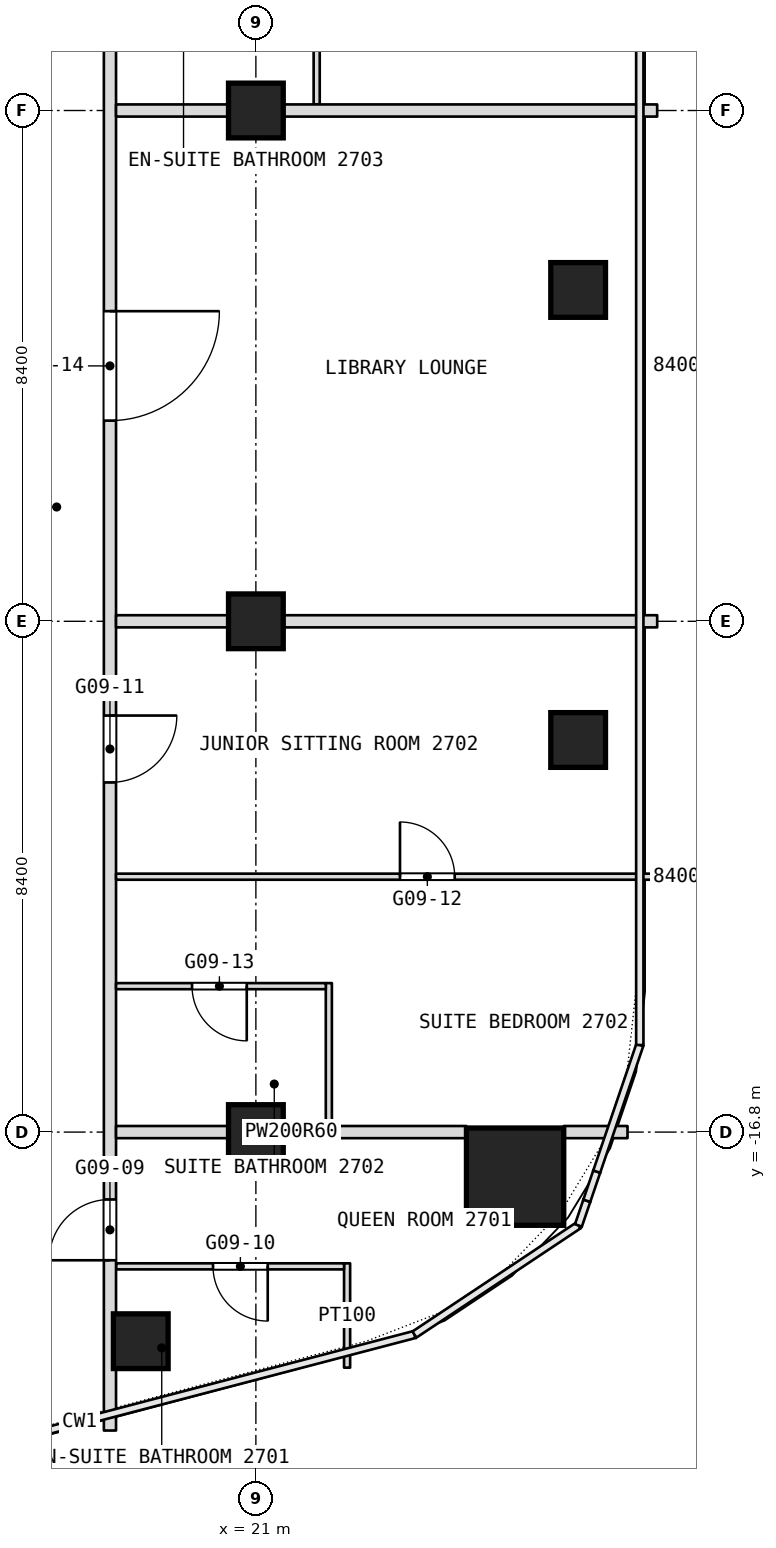
"""IFC4 building model, lengths in metres.
Left out: names, types, materials, properties, quantities, classifications, styles, units other than length and angle.
Written with IfcOpenShell. Run it as: python <this file> out.ifc"""

import sys

from ifc_helpers import new_model, si_unit, direction, frame, frame_2d, origin, origin_2d, place, context, subcontext, project, spatial, rectangle, extrude, element, fill, save


model = new_model("IFC4")
c1 = context("Model", 3, precision=1e-05, world=origin(), true_north=direction((0.0, 1.0)))
c2 = subcontext(c1, "Body", "Model", "MODEL_VIEW")
j1 = project(units=[si_unit("LENGTHUNIT", "METRE"), si_unit("PLANEANGLEUNIT", "RADIAN")], contexts=[c1])
p1 = place(None, origin())
s1 = spatial("IfcSite", under=j1, at=p1, CompositionType="ELEMENT")
p2 = place(p1, origin())
s2 = spatial("IfcBuilding", under=s1, at=p2, CompositionType="ELEMENT")
p3 = place(p2, frame((0.0, 0.0, 122.9)))
s3 = spatial("IfcBuildingStorey", under=s2, at=p3, CompositionType="ELEMENT", Elevation=122.9)
p4 = place(p3, frame((25.263, -17.533, 0.0), z_axis=(0.0, 0.0, 1.0), x_axis=(1.0, 0.0, 0.0)))
e1 = element("IfcColumn", 1, at=p4, inside=s3, PredefinedType="COLUMN", context=c2, shape_type="SweptSolid", body=[
    extrude(rectangle(XDim=1.6, YDim=1.6, at=origin_2d()), origin(), (0.0, 0.0, 1.0), 3.6),
])
for number, where, z_axis, x_axis in (
    (2, (21.0, -16.8, 0.0), (0.0, 0.0, 1.0), (1.0, 0.0, 0.0)),
    (3, (21.0, -8.4, 0.0), (0.0, 0.0, 1.0), (1.0, 0.0, 0.0)),
    (4, (21.0, 0.0, 0.0), (0.0, 0.0, 1.0), (1.0, 0.0, 0.0)),
    (5, (26.3, -2.951, 0.0), (0.0, 0.0, 1.0), (1.0, 0.0, 0.0)),
    (6, (26.3, -10.352, 0.0), (0.0, 0.0, 1.0), (1.0, 0.0, 0.0)),
    (7, (19.107, -20.239, 0.0), (0.0, 0.0, 1.0), (1.0, 0.0, 0.0)),
):
    element("IfcColumn", number, at=place(p3, frame(where, z_axis=z_axis, x_axis=x_axis)), inside=s3, PredefinedType="COLUMN", context=c2, shape_type="SweptSolid", body=[
        extrude(rectangle(XDim=0.9, YDim=0.9, at=origin_2d()), origin(), (0.0, 0.0, 1.0), 3.6),
    ])
p5 = place(p3, frame((22.5, -20.674, 0.0), z_axis=(0.0, 0.0, 1.0), x_axis=(0.0, 1.0, 0.0)))
e8 = element("IfcWall", 8, at=p5, inside=s3, PredefinedType="PARTITIONING", context=c2, shape_type="SweptSolid", body=[
    extrude(rectangle(XDim=1.716, YDim=0.1, at=frame_2d((0.858, 0.0))), origin(), (0.0, 0.0, 1.0), 3.34),
])
p6 = place(p3, frame((22.2, -16.7, 0.0), z_axis=(0.0, 0.0, 1.0), x_axis=(0.0, 1.0, 0.0)))
e9 = element("IfcWall", 9, at=p6, inside=s3, PredefinedType="PARTITIONING", context=c2, shape_type="SweptSolid", body=[
    extrude(rectangle(XDim=2.35, YDim=0.1, at=frame_2d((1.175, 0.0))), origin(), (0.0, 0.0, 1.0), 3.34),
])
p7 = place(p3, frame((22.0, 0.1, 0.0), z_axis=(0.0, 0.0, 1.0), x_axis=(0.0, 1.0, 0.0)))
e10 = element("IfcWall", 10, at=p7, inside=s3, PredefinedType="PARTITIONING", context=c2, shape_type="SweptSolid", body=[
    extrude(rectangle(XDim=2.35, YDim=0.1, at=frame_2d((1.175, 0.0))), origin(), (0.0, 0.0, 1.0), 3.34),
])
p8 = place(p7, frame((1.3, 0.0, 0.0)))
e11 = element("IfcOpeningElement", 11, at=p8, cuts=e10, PredefinedType="OPENING", context=c2, shape_type="SweptSolid", body=[
    extrude(rectangle(XDim=0.9, YDim=2.1, at=frame_2d((0.45, 1.05))), frame((0.0, 0.05, 0.0), z_axis=(0.0, -1.0, 0.0), x_axis=(1.0, 0.0, 0.0)), (0.0, 0.0, 1.0), 0.1),
])
p9 = place(p3, frame((18.7, -19.008, 0.0), z_axis=(0.0, 0.0, 1.0), x_axis=(1.0, 0.0, 0.0)))
e12 = element("IfcWall", 12, at=p9, inside=s3, PredefinedType="PARTITIONING", context=c2, shape_type="SweptSolid", body=[
    extrude(rectangle(XDim=3.75, YDim=0.1, at=frame_2d((1.875, 0.0))), origin(), (0.0, 0.0, 1.0), 3.34),
])
p10 = place(p9, frame((1.595, 0.0, 0.0)))
e13 = element("IfcOpeningElement", 13, at=p10, cuts=e12, PredefinedType="OPENING", context=c2, shape_type="SweptSolid", body=[
    extrude(rectangle(XDim=0.9, YDim=2.1, at=frame_2d((0.45, 1.05))), frame((0.0, 0.05, 0.0), z_axis=(0.0, -1.0, 0.0), x_axis=(1.0, 0.0, 0.0)), (0.0, 0.0, 1.0), 0.1),
])
p11 = place(p3, frame((18.6, -21.708, 0.0), z_axis=(0.0, 0.0, 1.0), x_axis=(0.0, 1.0, 0.0)))
e14 = element("IfcWall", 14, at=p11, inside=s3, PredefinedType="PARTITIONING", context=c2, shape_type="SweptSolid", body=[
    extrude(rectangle(XDim=49.648, YDim=0.2, at=frame_2d((24.824, 0.0))), origin(), (0.0, 0.0, 1.0), 3.34),
])
p12 = place(p11, frame((2.8, 0.0, 0.0)))
e15 = element("IfcOpeningElement", 15, at=p12, cuts=e14, PredefinedType="OPENING", context=c2, shape_type="SweptSolid", body=[
    extrude(rectangle(XDim=1.0, YDim=2.1, at=frame_2d((0.5, 1.05))), frame((0.0, 0.1, 0.0), z_axis=(0.0, -1.0, 0.0), x_axis=(1.0, 0.0, 0.0)), (0.0, 0.0, 1.0), 0.2),
])
p13 = place(p11, frame((10.658, 0.0, 0.0)))
e16 = element("IfcOpeningElement", 16, at=p13, cuts=e14, PredefinedType="OPENING", context=c2, shape_type="SweptSolid", body=[
    extrude(rectangle(XDim=1.1, YDim=2.1, at=frame_2d((0.55, 1.05))), frame((0.0, 0.1, 0.0), z_axis=(0.0, -1.0, 0.0), x_axis=(1.0, 0.0, 0.0)), (0.0, 0.0, 1.0), 0.2),
])
p14 = place(p11, frame((16.608, 0.0, 0.0)))
e17 = element("IfcOpeningElement", 17, at=p14, cuts=e14, PredefinedType="OPENING", context=c2, shape_type="SweptSolid", body=[
    extrude(rectangle(XDim=1.8, YDim=2.1, at=frame_2d((0.9, 1.05))), frame((0.0, 0.1, 0.0), z_axis=(0.0, -1.0, 0.0), x_axis=(1.0, 0.0, 0.0)), (0.0, 0.0, 1.0), 0.2),
])
p15 = place(p11, frame((24.508, 0.0, 0.0)))
e18 = element("IfcOpeningElement", 18, at=p15, cuts=e14, PredefinedType="OPENING", context=c2, shape_type="SweptSolid", body=[
    extrude(rectangle(XDim=1.0, YDim=2.1, at=frame_2d((0.5, 1.05))), frame((0.0, 0.1, 0.0), z_axis=(0.0, -1.0, 0.0), x_axis=(1.0, 0.0, 0.0)), (0.0, 0.0, 1.0), 0.2),
])
p16 = place(p11, frame((26.308, 0.0, 0.0)))
e19 = element("IfcOpeningElement", 19, at=p16, cuts=e14, PredefinedType="OPENING", context=c2, shape_type="SweptSolid", body=[
    extrude(rectangle(XDim=1.0, YDim=2.1, at=frame_2d((0.5, 1.05))), frame((0.0, 0.1, 0.0), z_axis=(0.0, -1.0, 0.0), x_axis=(1.0, 0.0, 0.0)), (0.0, 0.0, 1.0), 0.2),
])
p17 = place(p11, frame((33.708, 0.0, 0.0)))
e20 = element("IfcOpeningElement", 20, at=p17, cuts=e14, PredefinedType="OPENING", context=c2, shape_type="SweptSolid", body=[
    extrude(rectangle(XDim=1.1, YDim=2.1, at=frame_2d((0.55, 1.05))), frame((0.0, 0.1, 0.0), z_axis=(0.0, -1.0, 0.0), x_axis=(1.0, 0.0, 0.0)), (0.0, 0.0, 1.0), 0.2),
])
p18 = place(p11, frame((42.608, 0.0, 0.0)))
e21 = element("IfcOpeningElement", 21, at=p18, cuts=e14, PredefinedType="OPENING", context=c2, shape_type="SweptSolid", body=[
    extrude(rectangle(XDim=1.0, YDim=2.1, at=frame_2d((0.5, 1.05))), frame((0.0, 0.1, 0.0), z_axis=(0.0, -1.0, 0.0), x_axis=(1.0, 0.0, 0.0)), (0.0, 0.0, 1.0), 0.2),
])
p19 = place(p11, frame((44.608, 0.0, 0.0)))
e22 = element("IfcOpeningElement", 22, at=p19, cuts=e14, PredefinedType="OPENING", context=c2, shape_type="SweptSolid", body=[
    extrude(rectangle(XDim=1.0, YDim=2.1, at=frame_2d((0.5, 1.05))), frame((0.0, 0.1, 0.0), z_axis=(0.0, -1.0, 0.0), x_axis=(1.0, 0.0, 0.0)), (0.0, 0.0, 1.0), 0.2),
])
p20 = place(p3, frame((18.7, -16.8, 0.0), z_axis=(0.0, 0.0, 1.0), x_axis=(1.0, 0.0, 0.0)))
e23 = element("IfcWall", 23, at=p20, inside=s3, PredefinedType="PARTITIONING", context=c2, shape_type="SweptSolid", body=[
    extrude(rectangle(XDim=5.763, YDim=0.2, at=frame_2d((2.881, 0.0))), origin(), (0.0, 0.0, 1.0), 2.89),
])
p21 = place(p3, frame((26.063, -16.8, 0.0), z_axis=(0.0, 0.0, 1.0), x_axis=(1.0, 0.0, 0.0)))
e24 = element("IfcWall", 24, at=p21, inside=s3, PredefinedType="PARTITIONING", context=c2, shape_type="SweptSolid", body=[
    extrude(rectangle(XDim=1.049, YDim=0.2, at=frame_2d((0.524, 0.0))), origin(), (0.0, 0.0, 1.0), 3.34),
])
p22 = place(p3, frame((18.7, -14.4, 0.0), z_axis=(0.0, 0.0, 1.0), x_axis=(1.0, 0.0, 0.0)))
e25 = element("IfcWall", 25, at=p22, inside=s3, PredefinedType="PARTITIONING", context=c2, shape_type="SweptSolid", body=[
    extrude(rectangle(XDim=3.45, YDim=0.1, at=frame_2d((1.725, 0.0))), origin(), (0.0, 0.0, 1.0), 3.34),
])
p23 = place(p22, frame((1.25, 0.0, 0.0)))
e26 = element("IfcOpeningElement", 26, at=p23, cuts=e25, PredefinedType="OPENING", context=c2, shape_type="SweptSolid", body=[
    extrude(rectangle(XDim=0.9, YDim=2.1, at=frame_2d((0.45, 1.05))), frame((0.0, 0.05, 0.0), z_axis=(0.0, -1.0, 0.0), x_axis=(1.0, 0.0, 0.0)), (0.0, 0.0, 1.0), 0.1),
])
p24 = place(p3, frame((18.7, -12.6, 0.0), z_axis=(0.0, 0.0, 1.0), x_axis=(1.0, 0.0, 0.0)))
e27 = element("IfcWall", 27, at=p24, inside=s3, PredefinedType="PARTITIONING", context=c2, shape_type="SweptSolid", body=[
    extrude(rectangle(XDim=8.9, YDim=0.1, at=frame_2d((4.45, 0.0))), origin(), (0.0, 0.0, 1.0), 3.34),
])
p25 = place(p24, frame((4.67, 0.0, 0.0)))
e28 = element("IfcOpeningElement", 28, at=p25, cuts=e27, PredefinedType="OPENING", context=c2, shape_type="SweptSolid", body=[
    extrude(rectangle(XDim=0.9, YDim=2.1, at=frame_2d((0.45, 1.05))), frame((0.0, 0.05, 0.0), z_axis=(0.0, -1.0, 0.0), x_axis=(1.0, 0.0, 0.0)), (0.0, 0.0, 1.0), 0.1),
])
for number, where, z_axis, x_axis in (
    (29, (18.7, -8.4, 0.0), (0.0, 0.0, 1.0), (1.0, 0.0, 0.0)),
    (30, (18.7, 0.0, 0.0), (0.0, 0.0, 1.0), (1.0, 0.0, 0.0)),
):
    element("IfcWall", number, at=place(p3, frame(where, z_axis=z_axis, x_axis=x_axis)), inside=s3, PredefinedType="PARTITIONING", context=c2, shape_type="SweptSolid", body=[
        extrude(rectangle(XDim=8.9, YDim=0.2, at=frame_2d((4.45, 0.0))), origin(), (0.0, 0.0, 1.0), 2.89),
    ])
p26 = place(p10, origin())
e31 = element("IfcDoor", 31, at=p26, inside=s3, OperationType="SINGLE_SWING_RIGHT", PredefinedType="DOOR", context=c2, shape_type="SweptSolid", body=[
    extrude(rectangle(XDim=0.9, YDim=2.1, at=frame_2d((0.45, 1.05))), frame((0.0, 0.025, 0.0), z_axis=(0.0, -1.0, 0.0), x_axis=(1.0, 0.0, 0.0)), (0.0, 0.0, 1.0), 0.05),
])
fill(e13, e31)
p27 = place(p12, origin())
e32 = element("IfcDoor", 32, at=p27, inside=s3, OperationType="SINGLE_SWING_RIGHT", PredefinedType="DOOR", context=c2, shape_type="SweptSolid", body=[
    extrude(rectangle(XDim=1.0, YDim=2.1, at=frame_2d((0.5, 1.05))), frame((0.0, 0.025, 0.0), z_axis=(0.0, -1.0, 0.0), x_axis=(1.0, 0.0, 0.0)), (0.0, 0.0, 1.0), 0.05),
])
fill(e15, e32)
p28 = place(p13, origin())
e33 = element("IfcDoor", 33, at=p28, inside=s3, OperationType="SINGLE_SWING_LEFT", PredefinedType="DOOR", context=c2, shape_type="SweptSolid", body=[
    extrude(rectangle(XDim=1.1, YDim=2.1, at=frame_2d((0.55, 1.05))), frame((0.0, 0.025, 0.0), z_axis=(0.0, -1.0, 0.0), x_axis=(1.0, 0.0, 0.0)), (0.0, 0.0, 1.0), 0.05),
])
fill(e16, e33)
p29 = place(p14, origin())
e34 = element("IfcDoor", 34, at=p29, inside=s3, OperationType="DOUBLE_DOOR_SINGLE_SWING", PredefinedType="DOOR", context=c2, shape_type="SweptSolid", body=[
    extrude(rectangle(XDim=1.8, YDim=2.1, at=frame_2d((0.9, 1.05))), frame((0.0, 0.025, 0.0), z_axis=(0.0, -1.0, 0.0), x_axis=(1.0, 0.0, 0.0)), (0.0, 0.0, 1.0), 0.05),
])
fill(e17, e34)
p30 = place(p23, origin())
e35 = element("IfcDoor", 35, at=p30, inside=s3, OperationType="SINGLE_SWING_RIGHT", PredefinedType="DOOR", context=c2, shape_type="SweptSolid", body=[
    extrude(rectangle(XDim=0.9, YDim=2.1, at=frame_2d((0.45, 1.05))), frame((0.0, 0.025, 0.0), z_axis=(0.0, -1.0, 0.0), x_axis=(1.0, 0.0, 0.0)), (0.0, 0.0, 1.0), 0.05),
])
fill(e26, e35)
p31 = place(p25, origin())
e36 = element("IfcDoor", 36, at=p31, inside=s3, OperationType="SINGLE_SWING_RIGHT", PredefinedType="DOOR", context=c2, shape_type="SweptSolid", body=[
    extrude(rectangle(XDim=0.9, YDim=2.1, at=frame_2d((0.45, 1.05))), frame((0.0, 0.025, 0.0), z_axis=(0.0, -1.0, 0.0), x_axis=(1.0, 0.0, 0.0)), (0.0, 0.0, 1.0), 0.05),
])
fill(e28, e36)
save(model, sys.argv[1])
